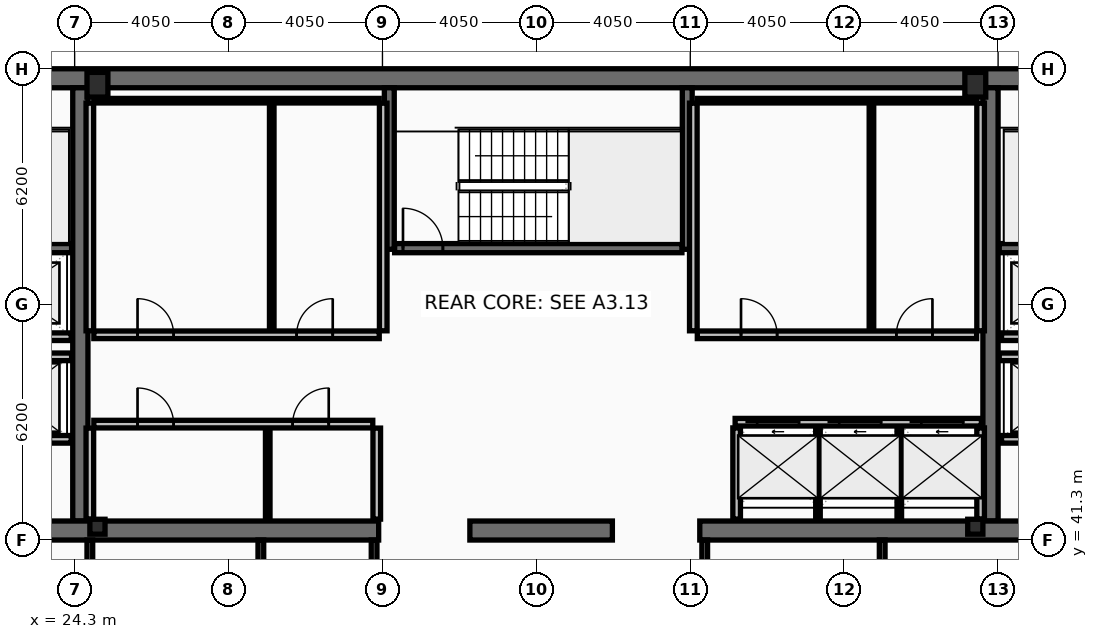
"""IFC4 building model, lengths in metres.
Left out: names, types, materials, properties, quantities, classifications, styles, units other than length and angle.
Written with IfcOpenShell. Run it as: python <this file> out.ifc"""

import sys

from ifc_helpers import new_model, si_unit, direction, frame, frame_2d, origin, origin_2d, place, context, subcontext, project, spatial, rectangle, hollow_rectangle, i_section, extrude, element, fill, save


model = new_model("IFC4")
c1 = context("Model", 3, precision=1e-05, world=origin(), true_north=direction((0.0, 1.0)))
c2 = subcontext(c1, "Body", "Model", "MODEL_VIEW")
j1 = project(units=[si_unit("LENGTHUNIT", "METRE"), si_unit("PLANEANGLEUNIT", "RADIAN")], contexts=[c1])
p1 = place(None, origin())
s1 = spatial("IfcSite", under=j1, at=p1, CompositionType="ELEMENT")
p2 = place(p1, origin())
s2 = spatial("IfcBuilding", under=s1, at=p2, CompositionType="ELEMENT")
p3 = place(p2, frame((0.0, 0.0, 343.4)))
s3 = spatial("IfcBuildingStorey", under=s2, at=p3, CompositionType="ELEMENT", Elevation=343.4)
p4 = place(p3, frame((16.2, 53.45, 0.0), z_axis=(0.0, 0.0, 1.0), x_axis=(1.0, 0.0, 0.0)))
e1 = element("IfcWall", 1, at=p4, inside=s3, PredefinedType="SHEAR", context=c2, shape_type="SweptSolid", body=[
    extrude(rectangle(XDim=40.5, YDim=0.5, at=frame_2d((20.25, 0.0))), origin(), (0.0, 0.0, 1.0), 3.44),
])
for number, where, z_axis, x_axis in (
    (2, (24.45, 41.8, 0.0), (0.0, 0.0, 1.0), (0.0, 1.0, 0.0)),
    (3, (48.4, 41.8, 0.0), (0.0, 0.0, 1.0), (0.0, 1.0, 0.0)),
):
    element("IfcWall", number, at=place(p3, frame(where, z_axis=z_axis, x_axis=x_axis)), inside=s3, PredefinedType="SHEAR", context=c2, shape_type="SweptSolid", body=[
        extrude(rectangle(XDim=11.4, YDim=0.4, at=frame_2d((5.7, 0.0))), origin(), (0.0, 0.0, 1.0), 3.44),
    ])
p5 = place(p3, frame((32.3, 41.55, 0.0), z_axis=(0.0, 0.0, 1.0), x_axis=(-1.0, 0.0, 0.0)))
e4 = element("IfcWall", 4, at=p5, inside=s3, PredefinedType="SHEAR", context=c2, shape_type="SweptSolid", body=[
    extrude(rectangle(XDim=11.45, YDim=0.5, at=frame_2d((5.725, 0.0))), origin(), (0.0, 0.0, 1.0), 3.44),
])
p6 = place(p3, frame((38.45, 41.55, 0.0), z_axis=(0.0, 0.0, 1.0), x_axis=(-1.0, 0.0, 0.0)))
e5 = element("IfcWall", 5, at=p6, inside=s3, PredefinedType="SHEAR", context=c2, shape_type="SweptSolid", body=[
    extrude(rectangle(XDim=3.75, YDim=0.5, at=frame_2d((1.875, 0.0))), origin(), (0.0, 0.0, 1.0), 3.44),
])
p7 = place(p3, frame((52.05, 41.55, 0.0), z_axis=(0.0, 0.0, 1.0), x_axis=(-1.0, 0.0, 0.0)))
e6 = element("IfcWall", 6, at=p7, inside=s3, PredefinedType="SHEAR", context=c2, shape_type="SweptSolid", body=[
    extrude(rectangle(XDim=11.3, YDim=0.5, at=frame_2d((5.65, 0.0))), origin(), (0.0, 0.0, 1.0), 3.44),
])
for number, where, z_axis, x_axis in (
    (7, (32.58, 48.95, 0.0), (0.0, 0.0, 1.0), (0.0, 1.0, 0.0)),
    (8, (40.42, 48.95, 0.0), (0.0, 0.0, 1.0), (0.0, 1.0, 0.0)),
):
    element("IfcWall", number, at=place(p3, frame(where, z_axis=z_axis, x_axis=x_axis)), inside=s3, PredefinedType="SHEAR", context=c2, shape_type="SweptSolid", body=[
        extrude(rectangle(XDim=4.25, YDim=0.26, at=frame_2d((2.125, 0.0))), origin(), (0.0, 0.0, 1.0), 3.44),
    ])
p8 = place(p3, frame((16.7, 48.98, 0.0), z_axis=(0.0, 0.0, 1.0), x_axis=(1.0, 0.0, 0.0)))
e9 = element("IfcWall", 9, at=p8, inside=s3, PredefinedType="SHEAR", context=c2, shape_type="SweptSolid", body=[
    extrude(rectangle(XDim=7.52, YDim=0.24, at=frame_2d((3.76, 0.0))), origin(), (0.0, 0.0, 1.0), 3.44),
])
p9 = place(p8, frame((0.22, 0.0, 0.0)))
e10 = element("IfcOpeningElement", 10, at=p9, cuts=e9, PredefinedType="OPENING", context=c2, shape_type="SweptSolid", body=[
    extrude(rectangle(XDim=1.05, YDim=2.15, at=frame_2d((0.525, 1.075))), frame((0.0, 0.13, 0.0), z_axis=(0.0, -1.0, 0.0), x_axis=(1.0, 0.0, 0.0)), (0.0, 0.0, 1.0), 0.26),
])
p10 = place(p3, frame((48.63, 48.98, 0.0), z_axis=(0.0, 0.0, 1.0), x_axis=(1.0, 0.0, 0.0)))
e11 = element("IfcWall", 11, at=p10, inside=s3, PredefinedType="SHEAR", context=c2, shape_type="SweptSolid", body=[
    extrude(rectangle(XDim=7.57, YDim=0.24, at=frame_2d((3.785, 0.0))), origin(), (0.0, 0.0, 1.0), 3.44),
])
p11 = place(p10, frame((6.3, 0.0, 0.0)))
e12 = element("IfcOpeningElement", 12, at=p11, cuts=e11, PredefinedType="OPENING", context=c2, shape_type="SweptSolid", body=[
    extrude(rectangle(XDim=1.05, YDim=2.15, at=frame_2d((0.525, 1.075))), frame((0.0, 0.13, 0.0), z_axis=(0.0, -1.0, 0.0), x_axis=(1.0, 0.0, 0.0)), (0.0, 0.0, 1.0), 0.26),
])
p12 = place(p3, frame((32.72, 48.98, 0.0), z_axis=(0.0, 0.0, 1.0), x_axis=(1.0, 0.0, 0.0)))
e13 = element("IfcWall", 13, at=p12, inside=s3, PredefinedType="SHEAR", context=c2, shape_type="SweptSolid", body=[
    extrude(rectangle(XDim=7.56, YDim=0.24, at=frame_2d((3.78, 0.0))), origin(), (0.0, 0.0, 1.0), 3.44),
])
p13 = place(p12, frame((0.22, 0.0, 0.0)))
e14 = element("IfcOpeningElement", 14, at=p13, cuts=e13, PredefinedType="OPENING", context=c2, shape_type="SweptSolid", body=[
    extrude(rectangle(XDim=1.05, YDim=2.15, at=frame_2d((0.525, 1.075))), frame((0.0, 0.13, 0.0), z_axis=(0.0, -1.0, 0.0), x_axis=(1.0, 0.0, 0.0)), (0.0, 0.0, 1.0), 0.26),
])
for number, where, z_axis, x_axis in (
    (15, (24.9, 53.28, 0.0), (0.0, 0.0, 1.0), (1.0, 0.0, 0.0)),
    (16, (48.0, 53.28, 0.0), (0.0, 0.0, 1.0), (1.0, 0.0, 0.0)),
):
    element("IfcColumn", number, at=place(p3, frame(where, z_axis=z_axis, x_axis=x_axis)), inside=s3, PredefinedType="COLUMN", context=c2, shape_type="SweptSolid", body=[
        extrude(hollow_rectangle(XDim=0.55, YDim=0.65, WallThickness=0.04, at=origin_2d()), origin(), (0.0, 0.0, 1.0), 3.6),
    ])
for number, where, z_axis, x_axis in (
    (17, (24.9, 41.65, 0.0), (0.0, 0.0, 1.0), (1.0, 0.0, 0.0)),
    (18, (48.0, 41.65, 0.0), (0.0, 0.0, 1.0), (1.0, 0.0, 0.0)),
):
    element("IfcColumn", number, at=place(p3, frame(where, z_axis=z_axis, x_axis=x_axis)), inside=s3, PredefinedType="COLUMN", context=c2, shape_type="SweptSolid", body=[
        extrude(i_section(OverallWidth=0.399, OverallDepth=0.393, WebThickness=0.023, FlangeThickness=0.037, at=origin_2d()), origin(), (0.0, 0.0, 1.0), 3.6),
    ])
p14 = place(p3, frame((41.68, 44.4, 0.0), z_axis=(0.0, 0.0, 1.0), x_axis=(1.0, 0.0, 0.0)))
e19 = element("IfcWall", 19, at=p14, inside=s3, PredefinedType="PARTITIONING", context=c2, shape_type="SweptSolid", body=[
    extrude(rectangle(XDim=6.48, YDim=0.2, at=frame_2d((3.24, 0.0))), origin(), (0.0, 0.0, 1.0), 3.44),
])
p15 = place(p14, frame((0.58, 0.0, 0.0)))
e20 = element("IfcOpeningElement", 20, at=p15, cuts=e19, PredefinedType="OPENING", context=c2, shape_type="SweptSolid", body=[
    extrude(rectangle(XDim=1.1, YDim=2.18, at=frame_2d((0.55, 1.09))), frame((0.0, 0.11, 0.0), z_axis=(0.0, -1.0, 0.0), x_axis=(1.0, 0.0, 0.0)), (0.0, 0.0, 1.0), 0.22),
])
p16 = place(p14, frame((2.74, 0.0, 0.0)))
e21 = element("IfcOpeningElement", 21, at=p16, cuts=e19, PredefinedType="OPENING", context=c2, shape_type="SweptSolid", body=[
    extrude(rectangle(XDim=1.1, YDim=2.18, at=frame_2d((0.55, 1.09))), frame((0.0, 0.11, 0.0), z_axis=(0.0, -1.0, 0.0), x_axis=(1.0, 0.0, 0.0)), (0.0, 0.0, 1.0), 0.22),
])
p17 = place(p14, frame((4.9, 0.0, 0.0)))
e22 = element("IfcOpeningElement", 22, at=p17, cuts=e19, PredefinedType="OPENING", context=c2, shape_type="SweptSolid", body=[
    extrude(rectangle(XDim=1.1, YDim=2.18, at=frame_2d((0.55, 1.09))), frame((0.0, 0.11, 0.0), z_axis=(0.0, -1.0, 0.0), x_axis=(1.0, 0.0, 0.0)), (0.0, 0.0, 1.0), 0.22),
])
p18 = place(p3, frame((51.61, 43.95, 0.0), z_axis=(0.0, 0.0, 1.0), x_axis=(-1.0, 0.0, 0.0)))
e23 = element("IfcWall", 23, at=p18, inside=s3, PredefinedType="PARTITIONING", context=c2, shape_type="SweptSolid", body=[
    extrude(rectangle(XDim=2.92, YDim=0.2, at=frame_2d((1.46, 0.0))), origin(), (0.0, 0.0, 1.0), 3.44),
])
p19 = place(p18, frame((0.81, 0.0, 0.0)))
e24 = element("IfcOpeningElement", 24, at=p19, cuts=e23, PredefinedType="OPENING", context=c2, shape_type="SweptSolid", body=[
    extrude(rectangle(XDim=1.3, YDim=2.18, at=frame_2d((0.65, 1.09))), frame((0.0, 0.11, 0.0), z_axis=(0.0, -1.0, 0.0), x_axis=(1.0, 0.0, 0.0)), (0.0, 0.0, 1.0), 0.22),
])
p20 = place(p3, frame((24.21, 43.95, 0.0), z_axis=(0.0, 0.0, 1.0), x_axis=(-1.0, 0.0, 0.0)))
e25 = element("IfcWall", 25, at=p20, inside=s3, PredefinedType="PARTITIONING", context=c2, shape_type="SweptSolid", body=[
    extrude(rectangle(XDim=2.97, YDim=0.2, at=frame_2d((1.485, 0.0))), origin(), (0.0, 0.0, 1.0), 3.44),
])
p21 = place(p20, frame((0.86, 0.0, 0.0)))
e26 = element("IfcOpeningElement", 26, at=p21, cuts=e25, PredefinedType="OPENING", context=c2, shape_type="SweptSolid", body=[
    extrude(rectangle(XDim=1.3, YDim=2.18, at=frame_2d((0.65, 1.09))), frame((0.0, 0.11, 0.0), z_axis=(0.0, -1.0, 0.0), x_axis=(1.0, 0.0, 0.0)), (0.0, 0.0, 1.0), 0.22),
])
p22 = place(p3, frame((51.61, 46.65, 0.0), z_axis=(0.0, 0.0, 1.0), x_axis=(-1.0, 0.0, 0.0)))
e27 = element("IfcWall", 27, at=p22, inside=s3, PredefinedType="PARTITIONING", context=c2, shape_type="SweptSolid", body=[
    extrude(rectangle(XDim=2.92, YDim=0.2, at=frame_2d((1.46, 0.0))), origin(), (0.0, 0.0, 1.0), 3.44),
])
p23 = place(p22, frame((0.86, 0.0, 0.0)))
e28 = element("IfcOpeningElement", 28, at=p23, cuts=e27, PredefinedType="OPENING", context=c2, shape_type="SweptSolid", body=[
    extrude(rectangle(XDim=1.2, YDim=2.18, at=frame_2d((0.6, 1.09))), frame((0.0, 0.11, 0.0), z_axis=(0.0, -1.0, 0.0), x_axis=(1.0, 0.0, 0.0)), (0.0, 0.0, 1.0), 0.22),
])
p24 = place(p3, frame((24.21, 46.65, 0.0), z_axis=(0.0, 0.0, 1.0), x_axis=(-1.0, 0.0, 0.0)))
e29 = element("IfcWall", 29, at=p24, inside=s3, PredefinedType="PARTITIONING", context=c2, shape_type="SweptSolid", body=[
    extrude(rectangle(XDim=2.97, YDim=0.2, at=frame_2d((1.485, 0.0))), origin(), (0.0, 0.0, 1.0), 3.44),
])
p25 = place(p24, frame((0.91, 0.0, 0.0)))
e30 = element("IfcOpeningElement", 30, at=p25, cuts=e29, PredefinedType="OPENING", context=c2, shape_type="SweptSolid", body=[
    extrude(rectangle(XDim=1.2, YDim=2.18, at=frame_2d((0.6, 1.09))), frame((0.0, 0.11, 0.0), z_axis=(0.0, -1.0, 0.0), x_axis=(1.0, 0.0, 0.0)), (0.0, 0.0, 1.0), 0.22),
])
p26 = place(p3, frame((21.2, 46.12, 0.0), z_axis=(0.0, 0.0, 1.0), x_axis=(1.0, 0.0, 0.0)))
e31 = element("IfcWall", 31, at=p26, inside=s3, PredefinedType="PARTITIONING", context=c2, shape_type="SweptSolid", body=[
    extrude(rectangle(XDim=3.02, YDim=0.2, at=frame_2d((1.51, 0.0))), origin(), (0.0, 0.0, 1.0), 3.44),
])
p27 = place(p3, frame((48.63, 46.12, 0.0), z_axis=(0.0, 0.0, 1.0), x_axis=(1.0, 0.0, 0.0)))
e32 = element("IfcWall", 32, at=p27, inside=s3, PredefinedType="PARTITIONING", context=c2, shape_type="SweptSolid", body=[
    extrude(rectangle(XDim=3.07, YDim=0.2, at=frame_2d((1.535, 0.0))), origin(), (0.0, 0.0, 1.0), 3.44),
])
for number, where, z_axis, x_axis in (
    (33, (24.7, 46.805, 0.0), (0.0, 0.0, 1.0), (0.0, 1.0, 0.0)),
    (34, (32.42, 46.805, 0.0), (0.0, 0.0, 1.0), (0.0, 1.0, 0.0)),
):
    element("IfcWall", number, at=place(p3, frame(where, z_axis=z_axis, x_axis=x_axis)), inside=s3, PredefinedType="PARTITIONING", context=c2, shape_type="SweptSolid", body=[
        extrude(rectangle(XDim=5.99, YDim=0.2, at=frame_2d((2.995, 0.0))), origin(), (0.0, 0.0, 1.0), 3.44),
    ])
p28 = place(p3, frame((24.805, 52.86, 0.0), z_axis=(0.0, 0.0, 1.0), x_axis=(1.0, 0.0, 0.0)))
e35 = element("IfcWall", 35, at=p28, inside=s3, PredefinedType="PARTITIONING", context=c2, shape_type="SweptSolid", body=[
    extrude(rectangle(XDim=7.51, YDim=0.12, at=frame_2d((3.755, 0.0))), origin(), (0.0, 0.0, 1.0), 3.44),
])
p29 = place(p3, frame((29.486, 46.805, 0.0), z_axis=(0.0, 0.0, 1.0), x_axis=(0.0, 1.0, 0.0)))
e36 = element("IfcWall", 36, at=p29, inside=s3, PredefinedType="PARTITIONING", context=c2, shape_type="SweptSolid", body=[
    extrude(rectangle(XDim=5.99, YDim=0.12, at=frame_2d((2.995, 0.0))), origin(), (0.0, 0.0, 1.0), 3.44),
])
p30 = place(p3, frame((24.805, 46.7, 0.0), z_axis=(0.0, 0.0, 1.0), x_axis=(1.0, 0.0, 0.0)))
e37 = element("IfcWall", 37, at=p30, inside=s3, PredefinedType="PARTITIONING", context=c2, shape_type="SweptSolid", body=[
    extrude(rectangle(XDim=7.51, YDim=0.2, at=frame_2d((3.755, 0.0))), origin(), (0.0, 0.0, 1.0), 3.44),
])
p31 = place(p30, frame((1.15, 0.0, 0.0)))
e38 = element("IfcOpeningElement", 38, at=p31, cuts=e37, PredefinedType="OPENING", context=c2, shape_type="SweptSolid", body=[
    extrude(rectangle(XDim=0.95, YDim=2.1, at=frame_2d((0.475, 1.05))), frame((0.0, 0.11, 0.0), z_axis=(0.0, -1.0, 0.0), x_axis=(1.0, 0.0, 0.0)), (0.0, 0.0, 1.0), 0.22),
])
p32 = place(p30, frame((5.336, 0.0, 0.0)))
e39 = element("IfcOpeningElement", 39, at=p32, cuts=e37, PredefinedType="OPENING", context=c2, shape_type="SweptSolid", body=[
    extrude(rectangle(XDim=0.95, YDim=2.1, at=frame_2d((0.475, 1.05))), frame((0.0, 0.11, 0.0), z_axis=(0.0, -1.0, 0.0), x_axis=(1.0, 0.0, 0.0)), (0.0, 0.0, 1.0), 0.22),
])
for number, where, z_axis, x_axis in (
    (40, (24.7, 41.85, 0.0), (0.0, 0.0, 1.0), (0.0, 1.0, 0.0)),
    (41, (32.25, 41.85, 0.0), (0.0, 0.0, 1.0), (0.0, 1.0, 0.0)),
):
    element("IfcWall", number, at=place(p3, frame(where, z_axis=z_axis, x_axis=x_axis)), inside=s3, PredefinedType="PARTITIONING", context=c2, shape_type="SweptSolid", body=[
        extrude(rectangle(XDim=2.395, YDim=0.2, at=frame_2d((1.198, 0.0))), origin(), (0.0, 0.0, 1.0), 3.44),
    ])
p33 = place(p3, frame((29.381, 41.85, 0.0), z_axis=(0.0, 0.0, 1.0), x_axis=(0.0, 1.0, 0.0)))
e42 = element("IfcWall", 42, at=p33, inside=s3, PredefinedType="PARTITIONING", context=c2, shape_type="SweptSolid", body=[
    extrude(rectangle(XDim=2.395, YDim=0.12, at=frame_2d((1.198, 0.0))), origin(), (0.0, 0.0, 1.0), 3.44),
])
p34 = place(p3, frame((24.805, 44.35, 0.0), z_axis=(0.0, 0.0, 1.0), x_axis=(1.0, 0.0, 0.0)))
e43 = element("IfcWall", 43, at=p34, inside=s3, PredefinedType="PARTITIONING", context=c2, shape_type="SweptSolid", body=[
    extrude(rectangle(XDim=7.34, YDim=0.2, at=frame_2d((3.67, 0.0))), origin(), (0.0, 0.0, 1.0), 3.44),
])
p35 = place(p34, frame((1.15, 0.0, 0.0)))
e44 = element("IfcOpeningElement", 44, at=p35, cuts=e43, PredefinedType="OPENING", context=c2, shape_type="SweptSolid", body=[
    extrude(rectangle(XDim=0.95, YDim=2.1, at=frame_2d((0.475, 1.05))), frame((0.0, 0.11, 0.0), z_axis=(0.0, -1.0, 0.0), x_axis=(1.0, 0.0, 0.0)), (0.0, 0.0, 1.0), 0.22),
])
p36 = place(p34, frame((5.231, 0.0, 0.0)))
e45 = element("IfcOpeningElement", 45, at=p36, cuts=e43, PredefinedType="OPENING", context=c2, shape_type="SweptSolid", body=[
    extrude(rectangle(XDim=0.95, YDim=2.1, at=frame_2d((0.475, 1.05))), frame((0.0, 0.11, 0.0), z_axis=(0.0, -1.0, 0.0), x_axis=(1.0, 0.0, 0.0)), (0.0, 0.0, 1.0), 0.22),
])
for number, where, z_axis, x_axis in (
    (46, (40.58, 46.805, 0.0), (0.0, 0.0, 1.0), (0.0, 1.0, 0.0)),
    (47, (48.14, 46.805, 0.0), (0.0, 0.0, 1.0), (0.0, 1.0, 0.0)),
):
    element("IfcWall", number, at=place(p3, frame(where, z_axis=z_axis, x_axis=x_axis)), inside=s3, PredefinedType="PARTITIONING", context=c2, shape_type="SweptSolid", body=[
        extrude(rectangle(XDim=5.99, YDim=0.2, at=frame_2d((2.995, 0.0))), origin(), (0.0, 0.0, 1.0), 3.44),
    ])
p37 = place(p3, frame((40.685, 52.86, 0.0), z_axis=(0.0, 0.0, 1.0), x_axis=(1.0, 0.0, 0.0)))
e48 = element("IfcWall", 48, at=p37, inside=s3, PredefinedType="PARTITIONING", context=c2, shape_type="SweptSolid", body=[
    extrude(rectangle(XDim=7.35, YDim=0.12, at=frame_2d((3.675, 0.0))), origin(), (0.0, 0.0, 1.0), 3.44),
])
p38 = place(p3, frame((45.267, 46.805, 0.0), z_axis=(0.0, 0.0, 1.0), x_axis=(0.0, 1.0, 0.0)))
e49 = element("IfcWall", 49, at=p38, inside=s3, PredefinedType="PARTITIONING", context=c2, shape_type="SweptSolid", body=[
    extrude(rectangle(XDim=5.99, YDim=0.12, at=frame_2d((2.995, 0.0))), origin(), (0.0, 0.0, 1.0), 3.44),
])
p39 = place(p3, frame((40.685, 46.7, 0.0), z_axis=(0.0, 0.0, 1.0), x_axis=(1.0, 0.0, 0.0)))
e50 = element("IfcWall", 50, at=p39, inside=s3, PredefinedType="PARTITIONING", context=c2, shape_type="SweptSolid", body=[
    extrude(rectangle(XDim=7.35, YDim=0.2, at=frame_2d((3.675, 0.0))), origin(), (0.0, 0.0, 1.0), 3.44),
])
p40 = place(p39, frame((1.15, 0.0, 0.0)))
e51 = element("IfcOpeningElement", 51, at=p40, cuts=e50, PredefinedType="OPENING", context=c2, shape_type="SweptSolid", body=[
    extrude(rectangle(XDim=0.95, YDim=2.1, at=frame_2d((0.475, 1.05))), frame((0.0, 0.11, 0.0), z_axis=(0.0, -1.0, 0.0), x_axis=(1.0, 0.0, 0.0)), (0.0, 0.0, 1.0), 0.22),
])
p41 = place(p39, frame((5.237, 0.0, 0.0)))
e52 = element("IfcOpeningElement", 52, at=p41, cuts=e50, PredefinedType="OPENING", context=c2, shape_type="SweptSolid", body=[
    extrude(rectangle(XDim=0.95, YDim=2.1, at=frame_2d((0.475, 1.05))), frame((0.0, 0.11, 0.0), z_axis=(0.0, -1.0, 0.0), x_axis=(1.0, 0.0, 0.0)), (0.0, 0.0, 1.0), 0.22),
])
for number, where, z_axis, x_axis in (
    (53, (41.72, 41.85, 0.0), (0.0, 0.0, 1.0), (0.0, 1.0, 0.0)),
    (54, (48.14, 41.85, 0.0), (0.0, 0.0, 1.0), (0.0, 1.0, 0.0)),
):
    element("IfcWall", number, at=place(p3, frame(where, z_axis=z_axis, x_axis=x_axis)), inside=s3, PredefinedType="PARTITIONING", context=c2, shape_type="SweptSolid", body=[
        extrude(rectangle(XDim=2.4, YDim=0.2, at=frame_2d((1.2, 0.0))), origin(), (0.0, 0.0, 1.0), 3.44),
    ])
for number, where, z_axis, x_axis in (
    (55, (43.86, 41.85, 0.0), (0.0, 0.0, 1.0), (0.0, 1.0, 0.0)),
    (56, (46.0, 41.85, 0.0), (0.0, 0.0, 1.0), (0.0, 1.0, 0.0)),
):
    element("IfcWall", number, at=place(p3, frame(where, z_axis=z_axis, x_axis=x_axis)), inside=s3, PredefinedType="PARTITIONING", context=c2, shape_type="SweptSolid", body=[
        extrude(rectangle(XDim=2.4, YDim=0.12, at=frame_2d((1.2, 0.0))), origin(), (0.0, 0.0, 1.0), 3.44),
    ])
p42 = place(p3, frame((24.7, 38.28, 0.0), z_axis=(0.0, 0.0, 1.0), x_axis=(0.0, 1.0, 0.0)))
e57 = element("IfcWall", 57, at=p42, inside=s3, PredefinedType="PARTITIONING", context=c2, shape_type="SweptSolid", body=[
    extrude(rectangle(XDim=3.02, YDim=0.15, at=frame_2d((1.51, 0.0))), origin(), (0.0, 0.0, 1.0), 2.83),
])
for number, where, z_axis, x_axis in (
    (58, (29.2, 38.28, 0.0), (0.0, 0.0, 1.0), (0.0, 1.0, 0.0)),
    (59, (32.18, 38.28, 0.0), (0.0, 0.0, 1.0), (0.0, 1.0, 0.0)),
    (60, (40.88, 38.28, 0.0), (0.0, 0.0, 1.0), (0.0, 1.0, 0.0)),
    (61, (45.55, 38.28, 0.0), (0.0, 0.0, 1.0), (0.0, 1.0, 0.0)),
):
    element("IfcWall", number, at=place(p3, frame(where, z_axis=z_axis, x_axis=x_axis)), inside=s3, PredefinedType="PARTITIONING", context=c2, shape_type="SweptSolid", body=[
        extrude(rectangle(XDim=3.02, YDim=0.15, at=frame_2d((1.51, 0.0))), origin(), (0.0, 0.0, 1.0), 3.44),
    ])
p43 = place(p13, origin())
e62 = element("IfcDoor", 62, at=p43, inside=s3, OperationType="SINGLE_SWING_LEFT", PredefinedType="DOOR", context=c2, shape_type="SweptSolid", body=[
    extrude(rectangle(XDim=1.05, YDim=2.15, at=frame_2d((0.525, 1.075))), frame((0.0, 0.025, 0.0), z_axis=(0.0, -1.0, 0.0), x_axis=(1.0, 0.0, 0.0)), (0.0, 0.0, 1.0), 0.05),
])
fill(e14, e62)
p44 = place(p15, origin())
e63 = element("IfcDoor", 63, at=p44, inside=s3, OperationType="SLIDING_TO_LEFT", PredefinedType="DOOR", context=c2, shape_type="SweptSolid", body=[
    extrude(rectangle(XDim=1.1, YDim=2.18, at=frame_2d((0.55, 1.09))), frame((0.0, 0.025, 0.0), z_axis=(0.0, -1.0, 0.0), x_axis=(1.0, 0.0, 0.0)), (0.0, 0.0, 1.0), 0.05),
])
fill(e20, e63)
p45 = place(p16, origin())
e64 = element("IfcDoor", 64, at=p45, inside=s3, OperationType="SLIDING_TO_LEFT", PredefinedType="DOOR", context=c2, shape_type="SweptSolid", body=[
    extrude(rectangle(XDim=1.1, YDim=2.18, at=frame_2d((0.55, 1.09))), frame((0.0, 0.025, 0.0), z_axis=(0.0, -1.0, 0.0), x_axis=(1.0, 0.0, 0.0)), (0.0, 0.0, 1.0), 0.05),
])
fill(e21, e64)
p46 = place(p17, origin())
e65 = element("IfcDoor", 65, at=p46, inside=s3, OperationType="SLIDING_TO_LEFT", PredefinedType="DOOR", context=c2, shape_type="SweptSolid", body=[
    extrude(rectangle(XDim=1.1, YDim=2.18, at=frame_2d((0.55, 1.09))), frame((0.0, 0.025, 0.0), z_axis=(0.0, -1.0, 0.0), x_axis=(1.0, 0.0, 0.0)), (0.0, 0.0, 1.0), 0.05),
])
fill(e22, e65)
p47 = place(p31, origin())
e66 = element("IfcDoor", 66, at=p47, inside=s3, OperationType="SINGLE_SWING_LEFT", PredefinedType="DOOR", context=c2, shape_type="SweptSolid", body=[
    extrude(rectangle(XDim=0.95, YDim=2.1, at=frame_2d((0.475, 1.05))), frame((0.0, 0.025, 0.0), z_axis=(0.0, -1.0, 0.0), x_axis=(1.0, 0.0, 0.0)), (0.0, 0.0, 1.0), 0.05),
])
fill(e38, e66)
p48 = place(p32, origin())
e67 = element("IfcDoor", 67, at=p48, inside=s3, OperationType="SINGLE_SWING_RIGHT", PredefinedType="DOOR", context=c2, shape_type="SweptSolid", body=[
    extrude(rectangle(XDim=0.95, YDim=2.1, at=frame_2d((0.475, 1.05))), frame((0.0, 0.025, 0.0), z_axis=(0.0, -1.0, 0.0), x_axis=(1.0, 0.0, 0.0)), (0.0, 0.0, 1.0), 0.05),
])
fill(e39, e67)
p49 = place(p35, origin())
e68 = element("IfcDoor", 68, at=p49, inside=s3, OperationType="SINGLE_SWING_LEFT", PredefinedType="DOOR", context=c2, shape_type="SweptSolid", body=[
    extrude(rectangle(XDim=0.95, YDim=2.1, at=frame_2d((0.475, 1.05))), frame((0.0, 0.025, 0.0), z_axis=(0.0, -1.0, 0.0), x_axis=(1.0, 0.0, 0.0)), (0.0, 0.0, 1.0), 0.05),
])
fill(e44, e68)
p50 = place(p36, origin())
e69 = element("IfcDoor", 69, at=p50, inside=s3, OperationType="SINGLE_SWING_RIGHT", PredefinedType="DOOR", context=c2, shape_type="SweptSolid", body=[
    extrude(rectangle(XDim=0.95, YDim=2.1, at=frame_2d((0.475, 1.05))), frame((0.0, 0.025, 0.0), z_axis=(0.0, -1.0, 0.0), x_axis=(1.0, 0.0, 0.0)), (0.0, 0.0, 1.0), 0.05),
])
fill(e45, e69)
p51 = place(p40, origin())
e70 = element("IfcDoor", 70, at=p51, inside=s3, OperationType="SINGLE_SWING_LEFT", PredefinedType="DOOR", context=c2, shape_type="SweptSolid", body=[
    extrude(rectangle(XDim=0.95, YDim=2.1, at=frame_2d((0.475, 1.05))), frame((0.0, 0.025, 0.0), z_axis=(0.0, -1.0, 0.0), x_axis=(1.0, 0.0, 0.0)), (0.0, 0.0, 1.0), 0.05),
])
fill(e51, e70)
p52 = place(p41, origin())
e71 = element("IfcDoor", 71, at=p52, inside=s3, OperationType="SINGLE_SWING_RIGHT", PredefinedType="DOOR", context=c2, shape_type="SweptSolid", body=[
    extrude(rectangle(XDim=0.95, YDim=2.1, at=frame_2d((0.475, 1.05))), frame((0.0, 0.025, 0.0), z_axis=(0.0, -1.0, 0.0), x_axis=(1.0, 0.0, 0.0)), (0.0, 0.0, 1.0), 0.05),
])
fill(e52, e71)
save(model, sys.argv[1])
